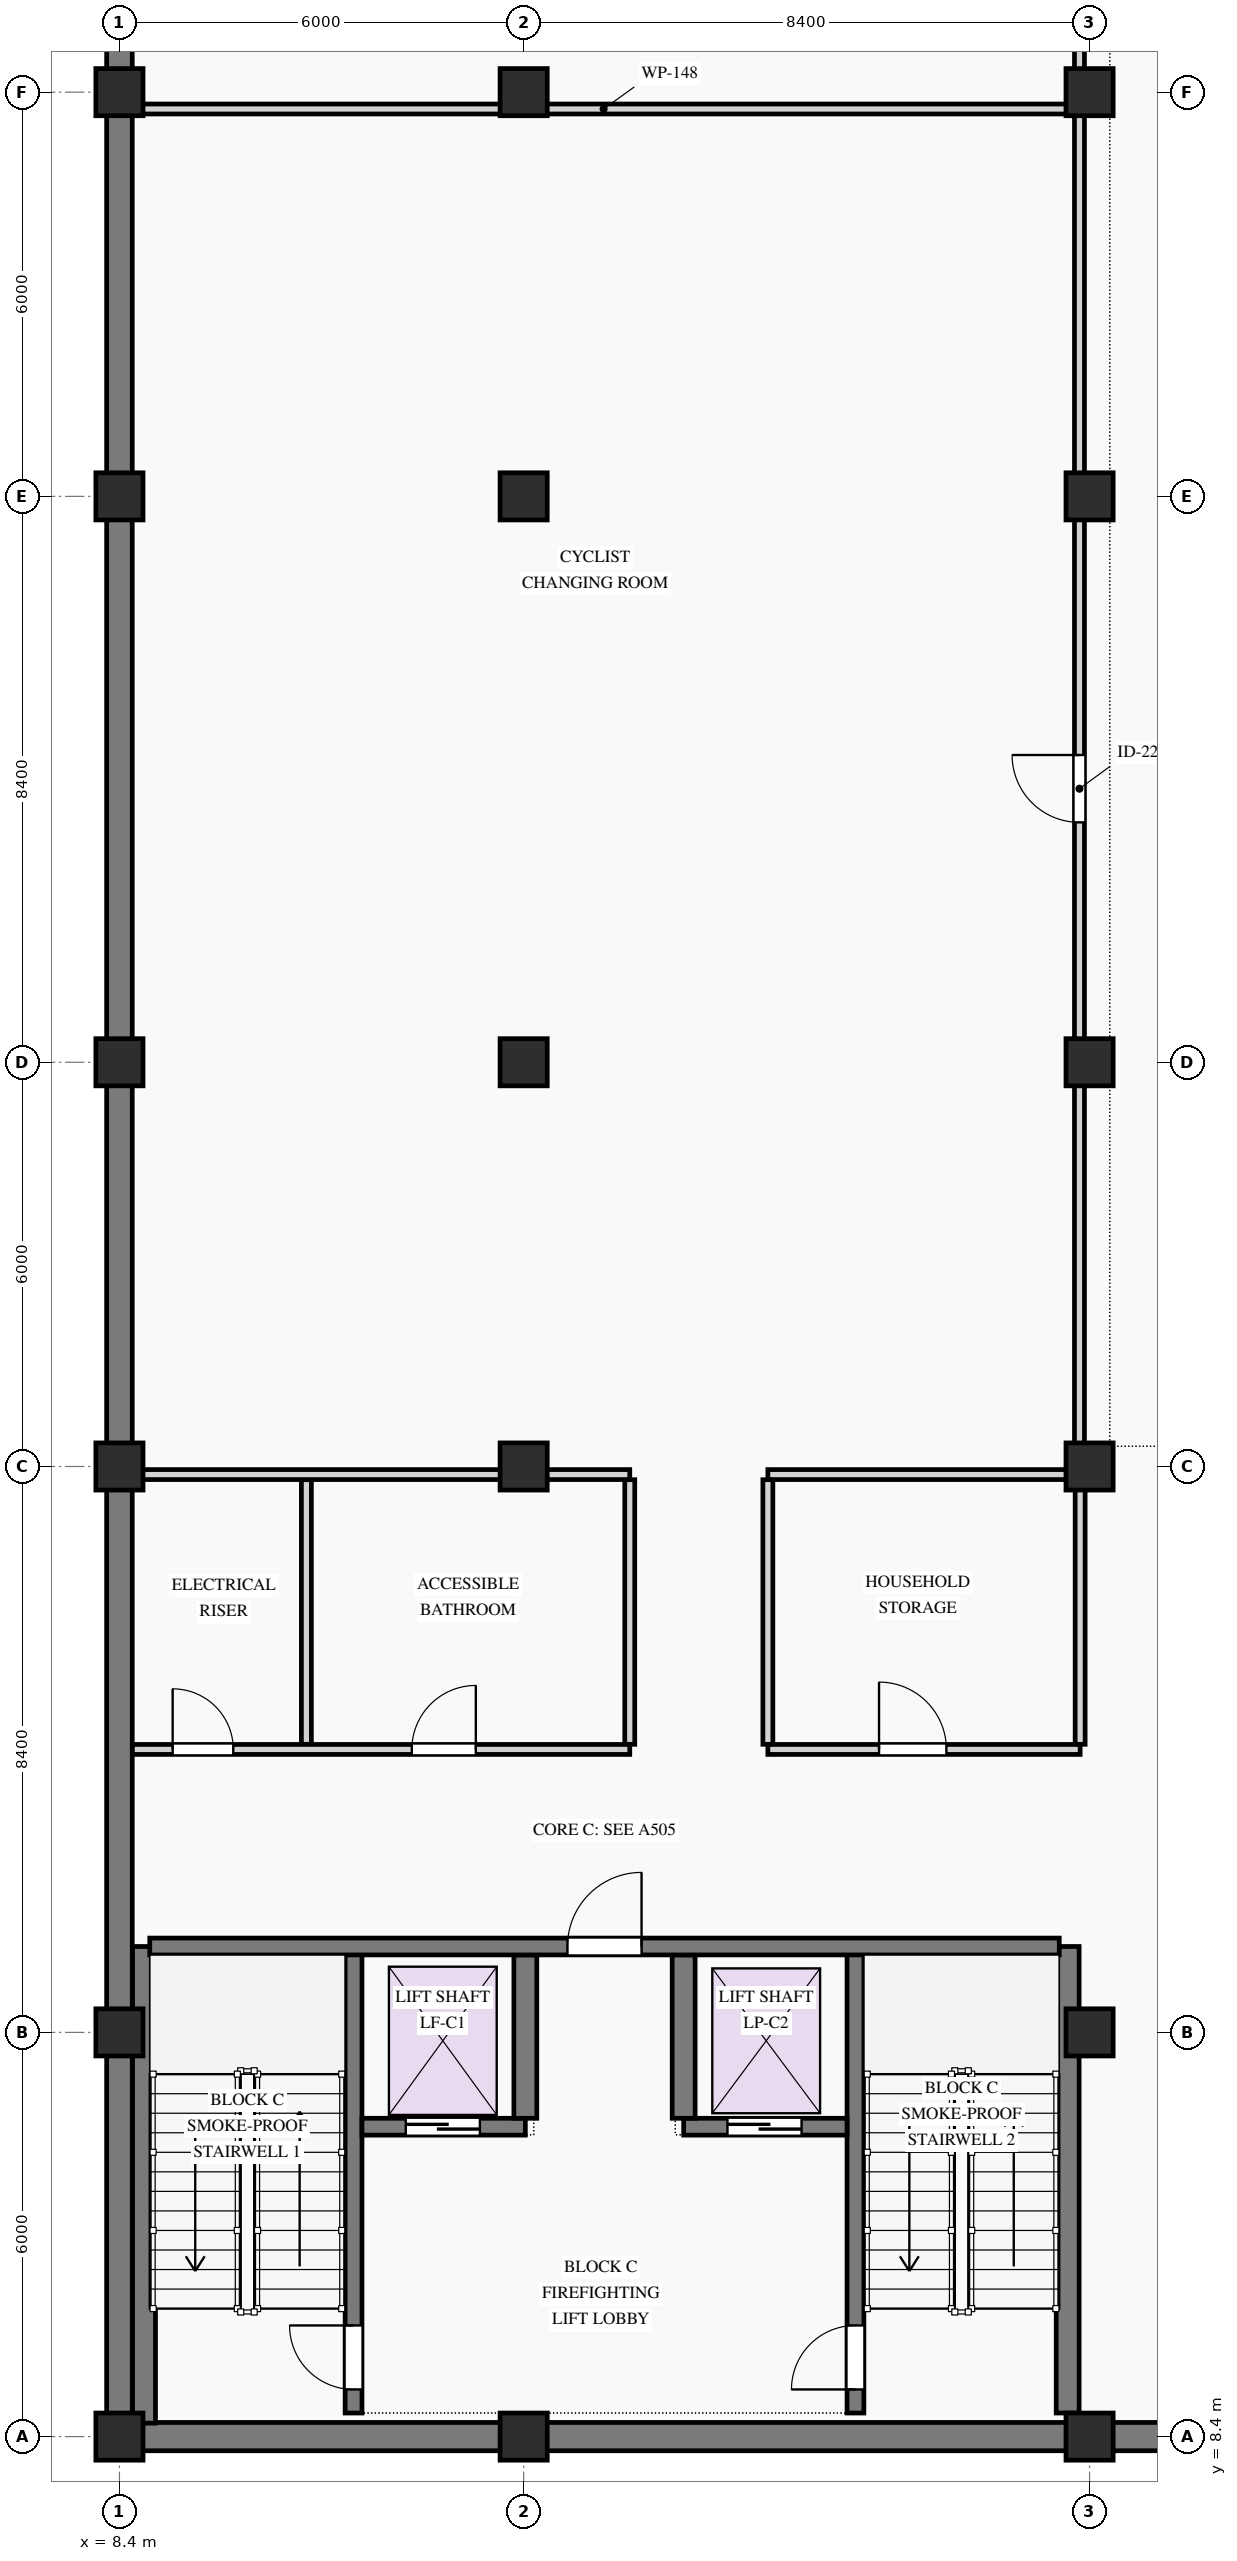
"""IFC4 building model, lengths in metres.
Left out: names, types, materials, properties, quantities, classifications, styles, units other than length and angle.
Written with IfcOpenShell. Run it as: python <this file> out.ifc"""

import sys

from ifc_helpers import new_model, si_unit, direction, frame, frame_2d, origin, origin_2d, place, context, subcontext, project, spatial, rectangle, extrude, element, fill, save


model = new_model("IFC4")
c1 = context("Model", 3, precision=1e-05, world=origin(), true_north=direction((0.0, 1.0)))
c2 = subcontext(c1, "Body", "Model", "MODEL_VIEW")
j1 = project(units=[si_unit("LENGTHUNIT", "METRE"), si_unit("PLANEANGLEUNIT", "RADIAN")], contexts=[c1])
p1 = place(None, origin())
s1 = spatial("IfcSite", under=j1, at=p1, CompositionType="ELEMENT")
p2 = place(p1, origin())
s2 = spatial("IfcBuilding", under=s1, at=p2, CompositionType="ELEMENT")
p3 = place(p2, frame((0.0, 0.0, -4.2)))
s3 = spatial("IfcBuildingStorey", under=s2, at=p3, CompositionType="ELEMENT", Elevation=-4.2)
for number, where, z_axis, x_axis in (
    (1, (8.4, 8.4, -0.45), (0.0, 0.0, 1.0), (1.0, 0.0, 0.0)),
    (2, (8.4, 14.4, -0.45), (0.0, 0.0, 1.0), (1.0, 0.0, 0.0)),
    (3, (8.4, 22.8, -0.45), (0.0, 0.0, 1.0), (1.0, 0.0, 0.0)),
    (4, (8.4, 28.8, -0.45), (0.0, 0.0, 1.0), (1.0, 0.0, 0.0)),
    (5, (8.4, 37.2, -0.45), (0.0, 0.0, 1.0), (1.0, 0.0, 0.0)),
    (6, (8.4, 43.2, -0.45), (0.0, 0.0, 1.0), (1.0, 0.0, 0.0)),
    (7, (14.4, 8.4, -0.45), (0.0, 0.0, 1.0), (1.0, 0.0, 0.0)),
    (8, (14.4, 22.8, -0.45), (0.0, 0.0, 1.0), (1.0, 0.0, 0.0)),
    (9, (14.4, 28.8, -0.45), (0.0, 0.0, 1.0), (1.0, 0.0, 0.0)),
    (10, (14.4, 37.2, -0.45), (0.0, 0.0, 1.0), (1.0, 0.0, 0.0)),
    (11, (14.4, 43.2, -0.45), (0.0, 0.0, 1.0), (1.0, 0.0, 0.0)),
    (12, (22.8, 8.4, -0.45), (0.0, 0.0, 1.0), (1.0, 0.0, 0.0)),
    (13, (22.8, 14.4, -0.45), (0.0, 0.0, 1.0), (1.0, 0.0, 0.0)),
    (14, (22.8, 22.8, -0.45), (0.0, 0.0, 1.0), (1.0, 0.0, 0.0)),
    (15, (22.8, 28.8, -0.45), (0.0, 0.0, 1.0), (1.0, 0.0, 0.0)),
    (16, (22.8, 37.2, -0.45), (0.0, 0.0, 1.0), (1.0, 0.0, 0.0)),
    (17, (22.8, 43.2, -0.45), (0.0, 0.0, 1.0), (1.0, 0.0, 0.0)),
):
    element("IfcColumn", number, at=place(p3, frame(where, z_axis=z_axis, x_axis=x_axis)), inside=s3, PredefinedType="COLUMN", context=c2, shape_type="SweptSolid", body=[
        extrude(rectangle(XDim=0.7, YDim=0.7, at=origin_2d()), origin(), (0.0, 0.0, 1.0), 4.65),
    ])
p4 = place(p3, frame((8.4, 123.6, 0.0), z_axis=(0.0, 0.0, 1.0), x_axis=(0.0, -1.0, 0.0)))
e18 = element("IfcWall", 18, at=p4, inside=s3, PredefinedType="SHEAR", context=c2, shape_type="SweptSolid", body=[
    extrude(rectangle(XDim=115.2, YDim=0.38, at=frame_2d((57.6, 0.0))), origin(), (0.0, 0.0, 1.0), 3.9),
])
p5 = place(p3, frame((8.4, 8.4, 0.0), z_axis=(0.0, 0.0, 1.0), x_axis=(1.0, 0.0, 0.0)))
e19 = element("IfcWall", 19, at=p5, inside=s3, PredefinedType="SHEAR", context=c2, shape_type="SweptSolid", body=[
    extrude(rectangle(XDim=57.6, YDim=0.42, at=frame_2d((28.8, 0.0))), origin(), (0.0, 0.0, 1.0), 3.9),
])
p6 = place(p3, frame((11.875, 8.75, 0.0), z_axis=(0.0, 0.0, 1.0), x_axis=(0.0, 1.0, 0.0)))
e20 = element("IfcWall", 20, at=p6, inside=s3, PredefinedType="SHEAR", context=c2, shape_type="SweptSolid", body=[
    extrude(rectangle(XDim=6.925, YDim=0.25, at=frame_2d((3.462, 0.0))), origin(), (0.0, 0.0, 1.0), 3.9),
])
p7 = place(p6, frame((0.35, 0.0, 0.0)))
e21 = element("IfcOpeningElement", 21, at=p7, cuts=e20, PredefinedType="OPENING", context=c2, shape_type="SweptSolid", body=[
    extrude(rectangle(XDim=0.95, YDim=2.1, at=frame_2d((0.475, 1.05))), frame((0.0, 0.135, 0.0), z_axis=(0.0, -1.0, 0.0), x_axis=(1.0, 0.0, 0.0)), (0.0, 0.0, 1.0), 0.27),
])
p8 = place(p3, frame((8.765, 8.6, 0.0), z_axis=(0.0, 0.0, 1.0), x_axis=(0.0, 1.0, 0.0)))
e22 = element("IfcWall", 22, at=p8, inside=s3, PredefinedType="SHEAR", context=c2, shape_type="SweptSolid", body=[
    extrude(rectangle(XDim=7.075, YDim=0.34, at=frame_2d((3.538, 0.0))), origin(), (0.0, 0.0, 1.0), 3.9),
])
p9 = place(p3, frame((22.475, 8.75, 0.0), z_axis=(0.0, 0.0, 1.0), x_axis=(0.0, 1.0, 0.0)))
e23 = element("IfcWall", 23, at=p9, inside=s3, PredefinedType="SHEAR", context=c2, shape_type="SweptSolid", body=[
    extrude(rectangle(XDim=6.925, YDim=0.34, at=frame_2d((3.462, 0.0))), origin(), (0.0, 0.0, 1.0), 3.9),
])
p10 = place(p3, frame((19.325, 8.75, 0.0), z_axis=(0.0, 0.0, 1.0), x_axis=(0.0, 1.0, 0.0)))
e24 = element("IfcWall", 24, at=p10, inside=s3, PredefinedType="SHEAR", context=c2, shape_type="SweptSolid", body=[
    extrude(rectangle(XDim=6.925, YDim=0.25, at=frame_2d((3.462, 0.0))), origin(), (0.0, 0.0, 1.0), 3.9),
])
p11 = place(p10, frame((0.35, 0.0, 0.0)))
e25 = element("IfcOpeningElement", 25, at=p11, cuts=e24, PredefinedType="OPENING", context=c2, shape_type="SweptSolid", body=[
    extrude(rectangle(XDim=0.95, YDim=2.1, at=frame_2d((0.475, 1.05))), frame((0.0, 0.135, 0.0), z_axis=(0.0, -1.0, 0.0), x_axis=(1.0, 0.0, 0.0)), (0.0, 0.0, 1.0), 0.27),
])
p12 = place(p3, frame((12.0, 13.0, 0.0), z_axis=(0.0, 0.0, 1.0), x_axis=(1.0, 0.0, 0.0)))
e26 = element("IfcWall", 26, at=p12, inside=s3, PredefinedType="SHEAR", context=c2, shape_type="SweptSolid", body=[
    extrude(rectangle(XDim=2.425, YDim=0.25, at=frame_2d((1.212, 0.0))), origin(), (0.0, 0.0, 1.0), 3.9),
])
p13 = place(p12, frame((0.65, 0.0, 0.0)))
e27 = element("IfcOpeningElement", 27, at=p13, cuts=e26, PredefinedType="OPENING", context=c2, shape_type="SweptSolid", body=[
    extrude(rectangle(XDim=1.1, YDim=2.15, at=frame_2d((0.55, 1.075))), frame((0.0, 0.135, 0.0), z_axis=(0.0, -1.0, 0.0), x_axis=(1.0, 0.0, 0.0)), (0.0, 0.0, 1.0), 0.27),
])
p14 = place(p3, frame((16.775, 13.0, 0.0), z_axis=(0.0, 0.0, 1.0), x_axis=(1.0, 0.0, 0.0)))
e28 = element("IfcWall", 28, at=p14, inside=s3, PredefinedType="SHEAR", context=c2, shape_type="SweptSolid", body=[
    extrude(rectangle(XDim=2.425, YDim=0.25, at=frame_2d((1.212, 0.0))), origin(), (0.0, 0.0, 1.0), 3.9),
])
p15 = place(p14, frame((0.65, 0.0, 0.0)))
e29 = element("IfcOpeningElement", 29, at=p15, cuts=e28, PredefinedType="OPENING", context=c2, shape_type="SweptSolid", body=[
    extrude(rectangle(XDim=1.1, YDim=2.15, at=frame_2d((0.55, 1.075))), frame((0.0, 0.135, 0.0), z_axis=(0.0, -1.0, 0.0), x_axis=(1.0, 0.0, 0.0)), (0.0, 0.0, 1.0), 0.27),
])
for number, where, z_axis, x_axis in (
    (30, (14.425, 13.125, 0.0), (0.0, 0.0, 1.0), (0.0, 1.0, 0.0)),
    (31, (16.775, 13.125, 0.0), (0.0, 0.0, 1.0), (0.0, 1.0, 0.0)),
):
    element("IfcWall", number, at=place(p3, frame(where, z_axis=z_axis, x_axis=x_axis)), inside=s3, PredefinedType="SHEAR", context=c2, shape_type="SweptSolid", body=[
        extrude(rectangle(XDim=2.425, YDim=0.34, at=frame_2d((1.212, 0.0))), origin(), (0.0, 0.0, 1.0), 3.9),
    ])
p16 = place(p3, frame((8.85, 15.675, 0.0), z_axis=(0.0, 0.0, 1.0), x_axis=(1.0, 0.0, 0.0)))
e32 = element("IfcWall", 32, at=p16, inside=s3, PredefinedType="SHEAR", context=c2, shape_type="SweptSolid", body=[
    extrude(rectangle(XDim=13.5, YDim=0.25, at=frame_2d((6.75, 0.0))), origin(), (0.0, 0.0, 1.0), 3.9),
])
p17 = place(p16, frame((6.2, 0.0, 0.0)))
e33 = element("IfcOpeningElement", 33, at=p17, cuts=e32, PredefinedType="OPENING", context=c2, shape_type="SweptSolid", body=[
    extrude(rectangle(XDim=1.1, YDim=2.15, at=frame_2d((0.55, 1.075))), frame((0.0, 0.135, 0.0), z_axis=(0.0, -1.0, 0.0), x_axis=(1.0, 0.0, 0.0)), (0.0, 0.0, 1.0), 0.27),
])
for number, where, z_axis, x_axis in (
    (34, (11.175, 18.676, 0.0), (0.0, 0.0, 1.0), (0.0, 1.0, 0.0)),
    (35, (15.975, 18.676, 0.0), (0.0, 0.0, 1.0), (0.0, 1.0, 0.0)),
    (36, (18.025, 18.676, 0.0), (0.0, 0.0, 1.0), (0.0, 1.0, 0.0)),
):
    element("IfcWall", number, at=place(p3, frame(where, z_axis=z_axis, x_axis=x_axis)), inside=s3, PredefinedType="PARTITIONING", context=c2, shape_type="SweptSolid", body=[
        extrude(rectangle(XDim=3.928, YDim=0.148, at=frame_2d((1.964, 0.0))), origin(), (0.0, 0.0, 1.0), 3.9),
    ])
p18 = place(p3, frame((22.66, 18.676, 0.0), z_axis=(0.0, 0.0, 1.0), x_axis=(0.0, 1.0, 0.0)))
e37 = element("IfcWall", 37, at=p18, inside=s3, PredefinedType="PARTITIONING", context=c2, shape_type="SweptSolid", body=[
    extrude(rectangle(XDim=3.928, YDim=0.148, at=frame_2d((1.964, 0.0))), origin(), (0.0, 0.0, 1.0), 3.185),
])
p19 = place(p3, frame((8.592, 18.6, 0.0), z_axis=(0.0, 0.0, 1.0), x_axis=(1.0, 0.0, 0.0)))
e38 = element("IfcWall", 38, at=p19, inside=s3, PredefinedType="PARTITIONING", context=c2, shape_type="SweptSolid", body=[
    extrude(rectangle(XDim=7.383, YDim=0.148, at=frame_2d((3.691, 0.0))), origin(), (0.0, 0.0, 1.0), 3.9),
])
p20 = place(p19, frame((0.598, 0.0, 0.0)))
e39 = element("IfcOpeningElement", 39, at=p20, cuts=e38, PredefinedType="OPENING", context=c2, shape_type="SweptSolid", body=[
    extrude(rectangle(XDim=0.9, YDim=2.1, at=frame_2d((0.45, 1.05))), frame((0.0, 0.084, 0.0), z_axis=(0.0, -1.0, 0.0), x_axis=(1.0, 0.0, 0.0)), (0.0, 0.0, 1.0), 0.168),
])
p21 = place(p19, frame((4.148, 0.0, 0.0)))
e40 = element("IfcOpeningElement", 40, at=p21, cuts=e38, PredefinedType="OPENING", context=c2, shape_type="SweptSolid", body=[
    extrude(rectangle(XDim=0.95, YDim=2.1, at=frame_2d((0.475, 1.05))), frame((0.0, 0.084, 0.0), z_axis=(0.0, -1.0, 0.0), x_axis=(1.0, 0.0, 0.0)), (0.0, 0.0, 1.0), 0.168),
])
p22 = place(p3, frame((18.025, 18.6, 0.0), z_axis=(0.0, 0.0, 1.0), x_axis=(1.0, 0.0, 0.0)))
e41 = element("IfcWall", 41, at=p22, inside=s3, PredefinedType="PARTITIONING", context=c2, shape_type="SweptSolid", body=[
    extrude(rectangle(XDim=4.635, YDim=0.148, at=frame_2d((2.317, 0.0))), origin(), (0.0, 0.0, 1.0), 3.9),
])
p23 = place(p22, frame((1.65, 0.0, 0.0)))
e42 = element("IfcOpeningElement", 42, at=p23, cuts=e41, PredefinedType="OPENING", context=c2, shape_type="SweptSolid", body=[
    extrude(rectangle(XDim=1.0, YDim=2.15, at=frame_2d((0.5, 1.075))), frame((0.0, 0.084, 0.0), z_axis=(0.0, -1.0, 0.0), x_axis=(1.0, 0.0, 0.0)), (0.0, 0.0, 1.0), 0.168),
])
p24 = place(p3, frame((8.592, 22.68, 0.0), z_axis=(0.0, 0.0, 1.0), x_axis=(1.0, 0.0, 0.0)))
e43 = element("IfcWall", 43, at=p24, inside=s3, PredefinedType="PARTITIONING", context=c2, shape_type="SweptSolid", body=[
    extrude(rectangle(XDim=7.383, YDim=0.148, at=frame_2d((3.691, 0.0))), origin(), (0.0, 0.0, 1.0), 3.185),
])
p25 = place(p3, frame((18.025, 22.68, 0.0), z_axis=(0.0, 0.0, 1.0), x_axis=(1.0, 0.0, 0.0)))
e44 = element("IfcWall", 44, at=p25, inside=s3, PredefinedType="PARTITIONING", context=c2, shape_type="SweptSolid", body=[
    extrude(rectangle(XDim=4.635, YDim=0.148, at=frame_2d((2.317, 0.0))), origin(), (0.0, 0.0, 1.0), 3.185),
])
p26 = place(p3, frame((8.6, 42.95, 0.0), z_axis=(0.0, 0.0, 1.0), x_axis=(1.0, 0.0, 0.0)))
e45 = element("IfcWall", 45, at=p26, inside=s3, PredefinedType="PARTITIONING", context=c2, shape_type="SweptSolid", body=[
    extrude(rectangle(XDim=13.974, YDim=0.148, at=frame_2d((6.987, 0.0))), origin(), (0.0, 0.0, 1.0), 3.185),
])
p27 = place(p3, frame((22.65, 22.8, 0.0), z_axis=(0.0, 0.0, 1.0), x_axis=(0.0, 1.0, 0.0)))
e46 = element("IfcWall", 46, at=p27, inside=s3, PredefinedType="PARTITIONING", context=c2, shape_type="SweptSolid", body=[
    extrude(rectangle(XDim=34.8, YDim=0.148, at=frame_2d((17.4, 0.0))), origin(), (0.0, 0.0, 1.0), 3.185),
])
p28 = place(p27, frame((9.561, 0.0, 0.0)))
e47 = element("IfcOpeningElement", 47, at=p28, cuts=e46, PredefinedType="OPENING", context=c2, shape_type="SweptSolid", body=[
    extrude(rectangle(XDim=1.0, YDim=2.1, at=frame_2d((0.5, 1.05))), frame((0.0, 0.084, 0.0), z_axis=(0.0, -1.0, 0.0), x_axis=(1.0, 0.0, 0.0)), (0.0, 0.0, 1.0), 0.168),
])
p29 = place(p27, frame((26.163, 0.0, 0.0)))
e48 = element("IfcOpeningElement", 48, at=p29, cuts=e46, PredefinedType="OPENING", context=c2, shape_type="SweptSolid", body=[
    extrude(rectangle(XDim=1.1, YDim=2.15, at=frame_2d((0.55, 1.075))), frame((0.0, 0.084, 0.0), z_axis=(0.0, -1.0, 0.0), x_axis=(1.0, 0.0, 0.0)), (0.0, 0.0, 1.0), 0.168),
])
p30 = place(p7, origin())
e49 = element("IfcDoor", 49, at=p30, inside=s3, OperationType="SINGLE_SWING_RIGHT", PredefinedType="DOOR", context=c2, shape_type="SweptSolid", body=[
    extrude(rectangle(XDim=0.95, YDim=2.1, at=frame_2d((0.475, 1.05))), frame((0.0, 0.025, 0.0), z_axis=(0.0, -1.0, 0.0), x_axis=(1.0, 0.0, 0.0)), (0.0, 0.0, 1.0), 0.05),
])
fill(e21, e49)
p31 = place(p11, origin())
e50 = element("IfcDoor", 50, at=p31, inside=s3, OperationType="SINGLE_SWING_LEFT", PredefinedType="DOOR", context=c2, shape_type="SweptSolid", body=[
    extrude(rectangle(XDim=0.95, YDim=2.1, at=frame_2d((0.475, 1.05))), frame((0.0, 0.025, 0.0), z_axis=(0.0, -1.0, 0.0), x_axis=(1.0, 0.0, 0.0)), (0.0, 0.0, 1.0), 0.05),
])
fill(e25, e50)
p32 = place(p13, origin())
e51 = element("IfcDoor", 51, at=p32, inside=s3, OperationType="SLIDING_TO_LEFT", PredefinedType="DOOR", context=c2, shape_type="SweptSolid", body=[
    extrude(rectangle(XDim=1.1, YDim=2.15, at=frame_2d((0.55, 1.075))), frame((0.0, 0.025, 0.0), z_axis=(0.0, -1.0, 0.0), x_axis=(1.0, 0.0, 0.0)), (0.0, 0.0, 1.0), 0.05),
])
fill(e27, e51)
p33 = place(p15, origin())
e52 = element("IfcDoor", 52, at=p33, inside=s3, OperationType="SLIDING_TO_LEFT", PredefinedType="DOOR", context=c2, shape_type="SweptSolid", body=[
    extrude(rectangle(XDim=1.1, YDim=2.15, at=frame_2d((0.55, 1.075))), frame((0.0, 0.025, 0.0), z_axis=(0.0, -1.0, 0.0), x_axis=(1.0, 0.0, 0.0)), (0.0, 0.0, 1.0), 0.05),
])
fill(e29, e52)
p34 = place(p17, origin())
e53 = element("IfcDoor", 53, at=p34, inside=s3, OperationType="SINGLE_SWING_RIGHT", PredefinedType="DOOR", context=c2, shape_type="SweptSolid", body=[
    extrude(rectangle(XDim=1.1, YDim=2.15, at=frame_2d((0.55, 1.075))), frame((0.0, 0.025, 0.0), z_axis=(0.0, -1.0, 0.0), x_axis=(1.0, 0.0, 0.0)), (0.0, 0.0, 1.0), 0.05),
])
fill(e33, e53)
p35 = place(p20, origin())
e54 = element("IfcDoor", 54, at=p35, inside=s3, OperationType="SINGLE_SWING_LEFT", PredefinedType="DOOR", context=c2, shape_type="SweptSolid", body=[
    extrude(rectangle(XDim=0.9, YDim=2.1, at=frame_2d((0.45, 1.05))), frame((0.0, 0.025, 0.0), z_axis=(0.0, -1.0, 0.0), x_axis=(1.0, 0.0, 0.0)), (0.0, 0.0, 1.0), 0.05),
])
fill(e39, e54)
p36 = place(p21, origin())
e55 = element("IfcDoor", 55, at=p36, inside=s3, OperationType="SINGLE_SWING_RIGHT", PredefinedType="DOOR", context=c2, shape_type="SweptSolid", body=[
    extrude(rectangle(XDim=0.95, YDim=2.1, at=frame_2d((0.475, 1.05))), frame((0.0, 0.025, 0.0), z_axis=(0.0, -1.0, 0.0), x_axis=(1.0, 0.0, 0.0)), (0.0, 0.0, 1.0), 0.05),
])
fill(e40, e55)
p37 = place(p23, origin())
e56 = element("IfcDoor", 56, at=p37, inside=s3, OperationType="SINGLE_SWING_LEFT", PredefinedType="DOOR", context=c2, shape_type="SweptSolid", body=[
    extrude(rectangle(XDim=1.0, YDim=2.15, at=frame_2d((0.5, 1.075))), frame((0.0, 0.025, 0.0), z_axis=(0.0, -1.0, 0.0), x_axis=(1.0, 0.0, 0.0)), (0.0, 0.0, 1.0), 0.05),
])
fill(e42, e56)
p38 = place(p28, origin())
e57 = element("IfcDoor", 57, at=p38, inside=s3, OperationType="SINGLE_SWING_RIGHT", PredefinedType="DOOR", context=c2, shape_type="SweptSolid", body=[
    extrude(rectangle(XDim=1.0, YDim=2.1, at=frame_2d((0.5, 1.05))), frame((0.0, 0.025, 0.0), z_axis=(0.0, -1.0, 0.0), x_axis=(1.0, 0.0, 0.0)), (0.0, 0.0, 1.0), 0.05),
])
fill(e47, e57)
save(model, sys.argv[1])
